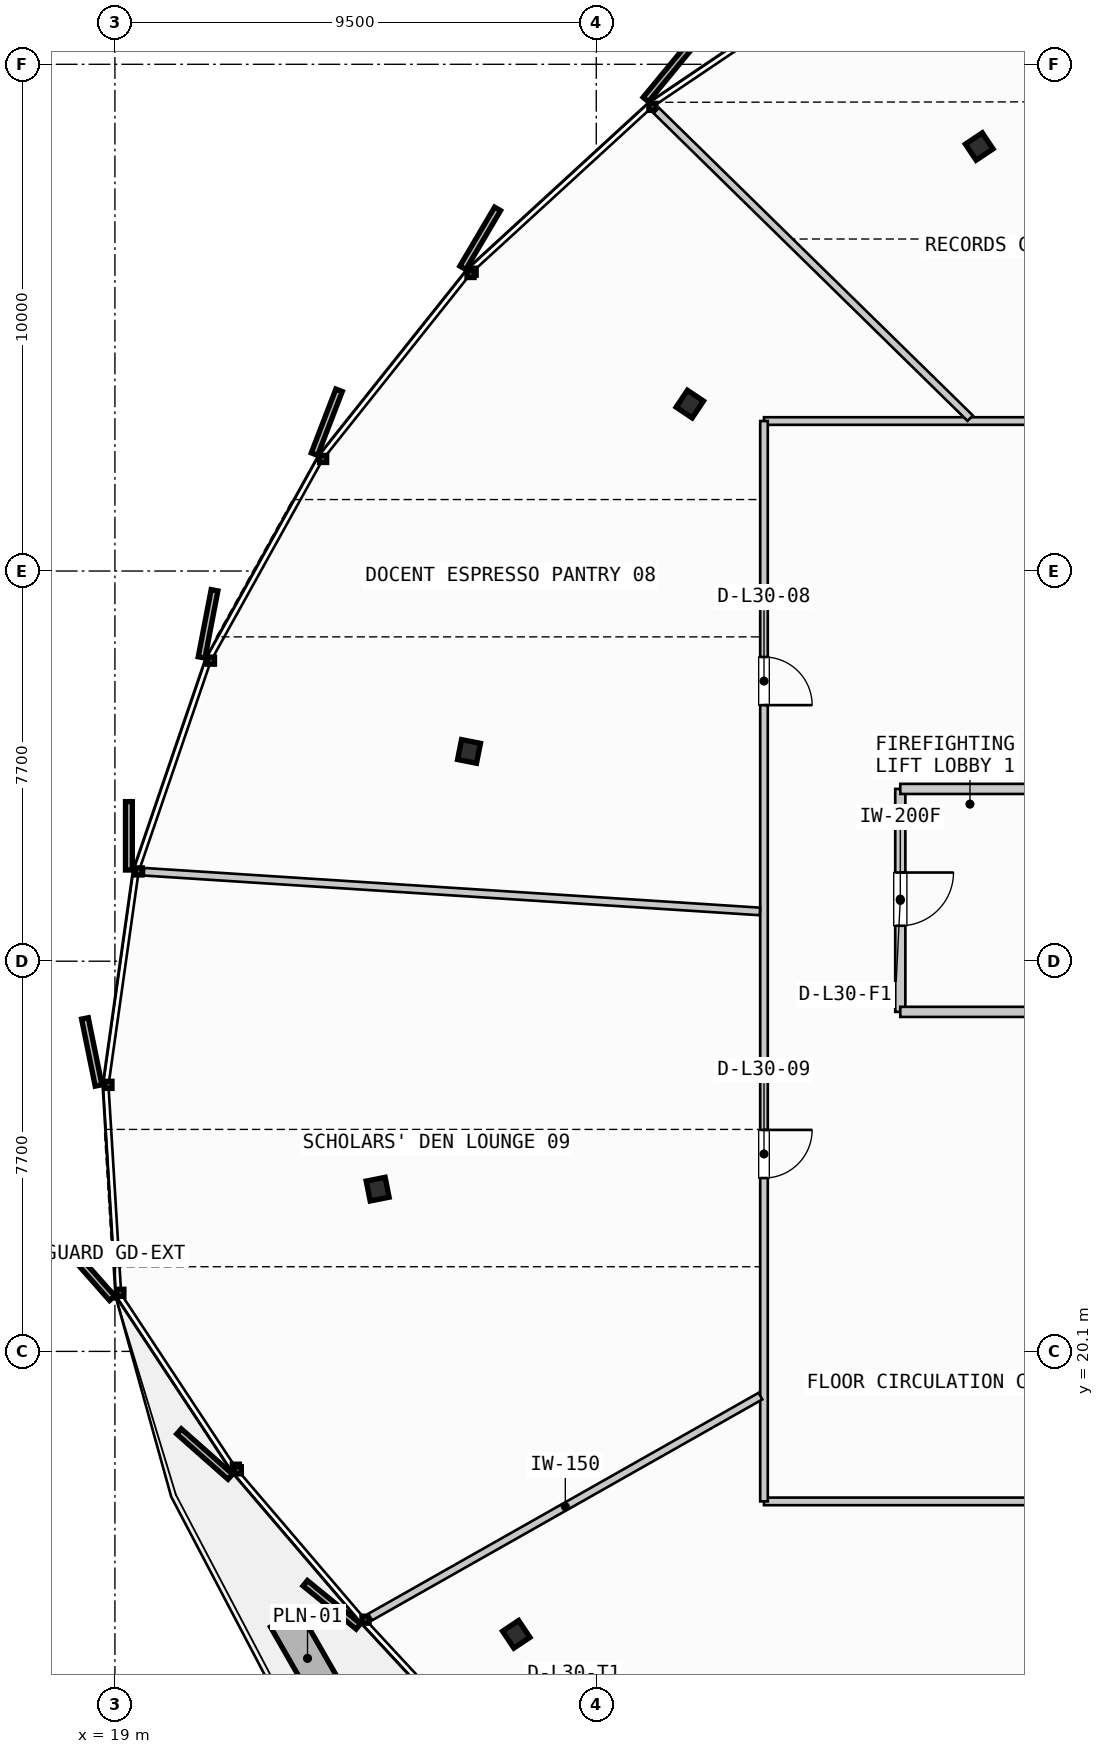
"""IFC4 building model, lengths in metres.
Left out: names, types, materials, properties, quantities, classifications, styles, units other than length and angle.
Written with IfcOpenShell. Run it as: python <this file> out.ifc"""

import sys

from ifc_helpers import new_model, si_unit, direction, frame, frame_2d, origin, origin_2d, place, context, subcontext, project, spatial, rectangle, i_section, extrude, source, transform, mapped, element, fill, save


model = new_model("IFC4")
c1 = context("Model", 3, precision=1e-05, world=origin(), true_north=direction((0.0, 1.0)))
c2 = subcontext(c1, "Body", "Model", "MODEL_VIEW")
j1 = project(units=[si_unit("LENGTHUNIT", "METRE"), si_unit("PLANEANGLEUNIT", "RADIAN")], contexts=[c1])
p1 = place(None, origin())
s1 = spatial("IfcSite", under=j1, at=p1, CompositionType="ELEMENT")
p2 = place(p1, origin())
s2 = spatial("IfcBuilding", under=s1, at=p2, CompositionType="ELEMENT")
p3 = place(p2, frame((0.0, 0.0, 121.6)))
s3 = spatial("IfcBuildingStorey", under=s2, at=p3, CompositionType="ELEMENT", Elevation=121.6)
m1 = source(origin(), c2, "Body", "SweptSolid", [
    extrude(i_section(OverallWidth=0.401, OverallDepth=0.381, WebThickness=0.032, FlangeThickness=0.051, FilletRadius=0.015, at=origin_2d()), origin(), (0.0, 0.0, 1.0), 3.35),
])
for number, where, z_axis, x_axis in (
    (1, (36.058, 43.877, 0.0), (0.0, 0.0, 1.0), (-0.556, 0.831, 0.0)),
    (2, (30.346, 38.794, 0.0), (0.0, 0.0, 1.0), (-0.831, 0.556, 0.0)),
    (3, (25.989, 31.94, 0.0), (0.0, 0.0, 1.0), (-0.981, 0.195, 0.0)),
    (4, (24.185, 23.302, 0.0), (0.0, 0.0, 1.0), (-0.981, -0.195, 0.0)),
    (5, (26.921, 14.517, 0.0), (0.0, 0.0, 1.0), (-0.831, -0.556, 0.0)),
):
    element("IfcColumn", number, at=place(p3, frame(where, z_axis=z_axis, x_axis=x_axis)), inside=s3, PredefinedType="COLUMN", context=c2, shape_type="MappedRepresentation", body=[
        mapped(m1, transform((0.0, 0.0, 0.0), scale=1.0)),
    ])
p4 = place(p3, frame((34.5, 31.2, 0.0), z_axis=(0.0, 0.0, 1.0), x_axis=(0.0, -1.0, 0.0)))
e6 = element("IfcWall", 6, at=p4, inside=s3, PredefinedType="PARTITIONING", context=c2, shape_type="SweptSolid", body=[
    extrude(rectangle(XDim=4.4, YDim=0.2, at=frame_2d((2.2, 0.0))), origin(), (0.0, 0.0, 1.0), 2.775),
])
p5 = place(p4, frame((1.65, 0.0, 0.0)))
e7 = element("IfcOpeningElement", 7, at=p5, cuts=e6, PredefinedType="OPENING", context=c2, shape_type="SweptSolid", body=[
    extrude(rectangle(XDim=1.05, YDim=2.15, at=frame_2d((0.525, 1.075))), frame((0.0, 0.11, 0.0), z_axis=(0.0, -1.0, 0.0), x_axis=(1.0, 0.0, 0.0)), (0.0, 0.0, 1.0), 0.22),
])
for number, where, z_axis, x_axis in (
    (8, (34.5, 26.8, 0.0), (0.0, 0.0, 1.0), (1.0, 0.0, 0.0)),
    (9, (34.5, 31.2, 0.0), (0.0, 0.0, 1.0), (1.0, 0.0, 0.0)),
):
    element("IfcWall", number, at=place(p3, frame(where, z_axis=z_axis, x_axis=x_axis)), inside=s3, PredefinedType="PARTITIONING", context=c2, shape_type="SweptSolid", body=[
        extrude(rectangle(XDim=3.215, YDim=0.2, at=frame_2d((1.607, 0.0))), origin(), (0.0, 0.0, 1.0), 2.775),
    ])
p6 = place(p3, frame((31.81, 17.14, 0.0), z_axis=(0.0, 0.0, 1.0), x_axis=(1.0, 0.0, 0.0)))
e10 = element("IfcWall", 10, at=p6, inside=s3, PredefinedType="PARTITIONING", context=c2, shape_type="SweptSolid", body=[
    extrude(rectangle(XDim=29.98, YDim=0.15, at=frame_2d((14.99, 0.0))), origin(), (0.0, 0.0, 1.0), 2.775),
])
p7 = place(p6, frame((7.092, 0.0, 0.0)))
e11 = element("IfcOpeningElement", 11, at=p7, cuts=e10, PredefinedType="OPENING", context=c2, shape_type="SweptSolid", body=[
    extrude(rectangle(XDim=0.95, YDim=2.15, at=frame_2d((0.475, 1.075))), frame((0.0, 0.085, 0.0), z_axis=(0.0, -1.0, 0.0), x_axis=(1.0, 0.0, 0.0)), (0.0, 0.0, 1.0), 0.17),
])
p8 = place(p6, frame((19.789, 0.0, 0.0)))
e12 = element("IfcOpeningElement", 12, at=p8, cuts=e10, PredefinedType="OPENING", context=c2, shape_type="SweptSolid", body=[
    extrude(rectangle(XDim=0.95, YDim=2.15, at=frame_2d((0.475, 1.075))), frame((0.0, 0.085, 0.0), z_axis=(0.0, -1.0, 0.0), x_axis=(1.0, 0.0, 0.0)), (0.0, 0.0, 1.0), 0.17),
])
p9 = place(p3, frame((61.79, 38.46, 0.0), z_axis=(0.0, 0.0, 1.0), x_axis=(-1.0, 0.0, 0.0)))
e13 = element("IfcWall", 13, at=p9, inside=s3, PredefinedType="PARTITIONING", context=c2, shape_type="SweptSolid", body=[
    extrude(rectangle(XDim=29.98, YDim=0.15, at=frame_2d((14.99, 0.0))), origin(), (0.0, 0.0, 1.0), 2.775),
])
p10 = place(p9, frame((5.278, 0.0, 0.0)))
e14 = element("IfcOpeningElement", 14, at=p10, cuts=e13, PredefinedType="OPENING", context=c2, shape_type="SweptSolid", body=[
    extrude(rectangle(XDim=0.95, YDim=2.15, at=frame_2d((0.475, 1.075))), frame((0.0, 0.085, 0.0), z_axis=(0.0, -1.0, 0.0), x_axis=(1.0, 0.0, 0.0)), (0.0, 0.0, 1.0), 0.17),
])
p11 = place(p9, frame((14.242, 0.0, 0.0)))
e15 = element("IfcOpeningElement", 15, at=p11, cuts=e13, PredefinedType="OPENING", context=c2, shape_type="SweptSolid", body=[
    extrude(rectangle(XDim=0.95, YDim=2.15, at=frame_2d((0.475, 1.075))), frame((0.0, 0.085, 0.0), z_axis=(0.0, -1.0, 0.0), x_axis=(1.0, 0.0, 0.0)), (0.0, 0.0, 1.0), 0.17),
])
p12 = place(p9, frame((22.117, 0.0, 0.0)))
e16 = element("IfcOpeningElement", 16, at=p12, cuts=e13, PredefinedType="OPENING", context=c2, shape_type="SweptSolid", body=[
    extrude(rectangle(XDim=0.95, YDim=2.15, at=frame_2d((0.475, 1.075))), frame((0.0, 0.085, 0.0), z_axis=(0.0, -1.0, 0.0), x_axis=(1.0, 0.0, 0.0)), (0.0, 0.0, 1.0), 0.17),
])
p13 = place(p3, frame((31.81, 38.46, 0.0), z_axis=(0.0, 0.0, 1.0), x_axis=(0.0, -1.0, 0.0)))
e17 = element("IfcWall", 17, at=p13, inside=s3, PredefinedType="PARTITIONING", context=c2, shape_type="SweptSolid", body=[
    extrude(rectangle(XDim=21.32, YDim=0.15, at=frame_2d((10.66, 0.0))), origin(), (0.0, 0.0, 1.0), 2.775),
])
p14 = place(p13, frame((4.656, 0.0, 0.0)))
e18 = element("IfcOpeningElement", 18, at=p14, cuts=e17, PredefinedType="OPENING", context=c2, shape_type="SweptSolid", body=[
    extrude(rectangle(XDim=0.95, YDim=2.15, at=frame_2d((0.475, 1.075))), frame((0.0, 0.085, 0.0), z_axis=(0.0, -1.0, 0.0), x_axis=(1.0, 0.0, 0.0)), (0.0, 0.0, 1.0), 0.17),
])
p15 = place(p13, frame((13.989, 0.0, 0.0)))
e19 = element("IfcOpeningElement", 19, at=p15, cuts=e17, PredefinedType="OPENING", context=c2, shape_type="SweptSolid", body=[
    extrude(rectangle(XDim=0.95, YDim=2.15, at=frame_2d((0.475, 1.075))), frame((0.0, 0.085, 0.0), z_axis=(0.0, -1.0, 0.0), x_axis=(1.0, 0.0, 0.0)), (0.0, 0.0, 1.0), 0.17),
])
p16 = place(p3, frame((31.74, 19.218, 0.0), z_axis=(0.0, 0.0, 1.0), x_axis=(-0.870240569148, -0.492626990541, 0.0)))
e20 = element("IfcWall", 20, at=p16, inside=s3, PredefinedType="PARTITIONING", context=c2, shape_type="SweptSolid", body=[
    extrude(rectangle(XDim=8.852, YDim=0.15, at=frame_2d((4.426, 0.0))), origin(), (0.0, 0.0, 1.0), 2.775),
])
p17 = place(p3, frame((35.88, 38.516, 0.0), z_axis=(0.0, 0.0, 1.0), x_axis=(-0.714233380427, 0.69990762125, 0.0)))
e21 = element("IfcWall", 21, at=p17, inside=s3, PredefinedType="PARTITIONING", context=c2, shape_type="SweptSolid", body=[
    extrude(rectangle(XDim=8.674, YDim=0.15, at=frame_2d((4.337, 0.0))), origin(), (0.0, 0.0, 1.0), 2.775),
])
p18 = place(p3, frame((31.73, 28.782, 0.0), z_axis=(0.0, 0.0, 1.0), x_axis=(-0.997929833936, 0.064312102605, 0.0)))
e22 = element("IfcWall", 22, at=p18, inside=s3, PredefinedType="PARTITIONING", context=c2, shape_type="SweptSolid", body=[
    extrude(rectangle(XDim=12.182, YDim=0.15, at=frame_2d((6.091, 0.0))), origin(), (0.0, 0.0, 1.0), 2.775),
])
m2 = source(origin(), c2, "Body", "SweptSolid", [
    extrude(rectangle(XDim=1.05, YDim=2.15, at=frame_2d((0.525, 1.075))), frame((0.0, 0.025, 0.0), z_axis=(0.0, -1.0, 0.0), x_axis=(1.0, 0.0, 0.0)), (0.0, 0.0, 1.0), 0.05),
])
p19 = place(p5, origin())
e23 = element("IfcDoor", 23, at=p19, inside=s3, OperationType="SINGLE_SWING_LEFT", PredefinedType="DOOR", context=c2, shape_type="MappedRepresentation", body=[
    mapped(m2, transform((0.0, 0.0, 0.0), scale=1.0)),
])
fill(e7, e23)
m3 = source(origin(), c2, "Body", "SweptSolid", [
    extrude(rectangle(XDim=0.95, YDim=2.15, at=frame_2d((0.475, 1.075))), frame((0.0, 0.025, 0.0), z_axis=(0.0, -1.0, 0.0), x_axis=(1.0, 0.0, 0.0)), (0.0, 0.0, 1.0), 0.05),
])
p20 = place(p14, origin())
e24 = element("IfcDoor", 24, at=p20, inside=s3, OperationType="SINGLE_SWING_RIGHT", PredefinedType="DOOR", context=c2, shape_type="MappedRepresentation", body=[
    mapped(m3, transform((0.0, 0.0, 0.0), scale=1.0)),
])
fill(e18, e24)
p21 = place(p15, origin())
e25 = element("IfcDoor", 25, at=p21, inside=s3, OperationType="SINGLE_SWING_LEFT", PredefinedType="DOOR", context=c2, shape_type="MappedRepresentation", body=[
    mapped(m3, transform((0.0, 0.0, 0.0), scale=1.0)),
])
fill(e19, e25)
save(model, sys.argv[1])
